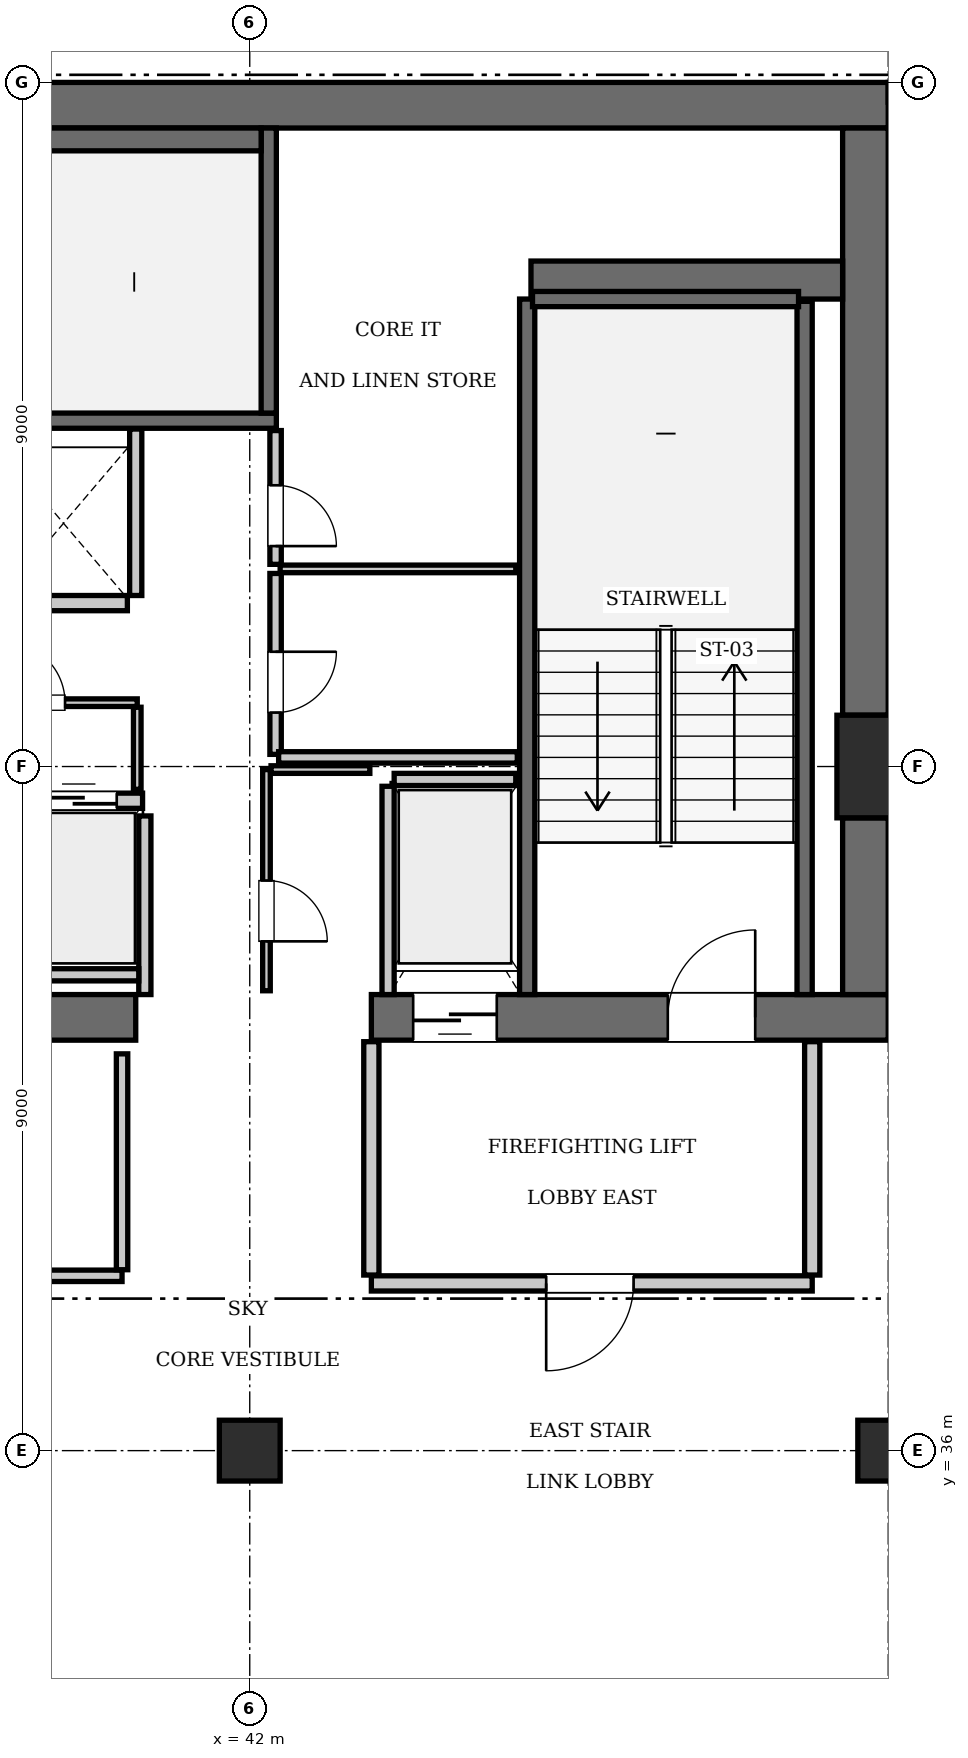
"""IFC4 building model, lengths in metres.
Left out: names, types, materials, properties, quantities, classifications, styles, units other than length and angle.
Written with IfcOpenShell. Run it as: python <this file> out.ifc"""

import sys

from ifc_helpers import new_model, si_unit, direction, frame, frame_2d, origin, origin_2d, place, context, subcontext, project, spatial, rectangle, extrude, element, fill, save


model = new_model("IFC4")
c1 = context("Model", 3, precision=1e-05, world=origin(), true_north=direction((0.0, 1.0)))
c2 = subcontext(c1, "Body", "Model", "MODEL_VIEW")
j1 = project(units=[si_unit("LENGTHUNIT", "METRE"), si_unit("PLANEANGLEUNIT", "RADIAN")], contexts=[c1])
p1 = place(None, origin())
s1 = spatial("IfcSite", under=j1, at=p1, CompositionType="ELEMENT")
p2 = place(p1, origin())
s2 = spatial("IfcBuilding", under=s1, at=p2, CompositionType="ELEMENT")
p3 = place(p2, frame((0.0, 0.0, 325.85)))
s3 = spatial("IfcBuildingStorey", under=s2, at=p3, CompositionType="ELEMENT", Elevation=325.85)
p4 = place(p3, frame((50.4, 45.0, 0.0), z_axis=(0.0, 0.0, 1.0), x_axis=(1.0, 0.0, 0.0)))
e1 = element("IfcColumn", 1, at=p4, inside=s3, PredefinedType="COLUMN", context=c2, shape_type="SweptSolid", body=[
    extrude(rectangle(XDim=1.35, YDim=1.35, at=origin_2d()), origin(), (0.0, 0.0, 1.0), 3.85),
])
p5 = place(p3, frame((25.2, 53.7, 0.0), z_axis=(0.0, 0.0, 1.0), x_axis=(1.0, 0.0, 0.0)))
e2 = element("IfcWall", 2, at=p5, inside=s3, PredefinedType="SHEAR", context=c2, shape_type="SweptSolid", body=[
    extrude(rectangle(XDim=25.2, YDim=0.6, at=frame_2d((12.6, 0.0))), origin(), (0.0, 0.0, 1.0), 3.85),
])
p6 = place(p3, frame((35.1, 41.7, 0.0), z_axis=(0.0, 0.0, 1.0), x_axis=(1.0, 0.0, 0.0)))
e3 = element("IfcWall", 3, at=p6, inside=s3, PredefinedType="SHEAR", context=c2, shape_type="SweptSolid", body=[
    extrude(rectangle(XDim=5.4, YDim=0.6, at=frame_2d((2.7, 0.0))), origin(), (0.0, 0.0, 1.0), 3.85),
])
p7 = place(p3, frame((43.6, 41.7, 0.0), z_axis=(0.0, 0.0, 1.0), x_axis=(1.0, 0.0, 0.0)))
e4 = element("IfcWall", 4, at=p7, inside=s3, PredefinedType="SHEAR", context=c2, shape_type="SweptSolid", body=[
    extrude(rectangle(XDim=6.8, YDim=0.6, at=frame_2d((3.4, 0.0))), origin(), (0.0, 0.0, 1.0), 3.85),
])
p8 = place(p7, frame((3.9, 0.0, 0.0)))
e5 = element("IfcOpeningElement", 5, at=p8, cuts=e4, PredefinedType="OPENING", context=c2, shape_type="SweptSolid", body=[
    extrude(rectangle(XDim=1.15, YDim=2.15, at=frame_2d((0.575, 1.075))), frame((0.0, 0.31, 0.0), z_axis=(0.0, -1.0, 0.0), x_axis=(1.0, 0.0, 0.0)), (0.0, 0.0, 1.0), 0.62),
])
p9 = place(p7, frame((0.55, 0.0, 0.0)))
e6 = element("IfcOpeningElement", 6, at=p9, cuts=e4, PredefinedType="OPENING", context=c2, shape_type="SweptSolid", body=[
    extrude(rectangle(XDim=1.1, YDim=2.2, at=frame_2d((0.55, 1.1))), frame((0.0, 0.31, 0.0), z_axis=(0.0, -1.0, 0.0), x_axis=(1.0, 0.0, 0.0)), (0.0, 0.0, 1.0), 0.62),
])
p10 = place(p3, frame((50.1, 42.0, 0.0), z_axis=(0.0, 0.0, 1.0), x_axis=(0.0, 1.0, 0.0)))
e7 = element("IfcWall", 7, at=p10, inside=s3, PredefinedType="SHEAR", context=c2, shape_type="SweptSolid", body=[
    extrude(rectangle(XDim=2.325, YDim=0.6, at=frame_2d((1.163, 0.0))), origin(), (0.0, 0.0, 1.0), 3.85),
])
p11 = place(p3, frame((50.1, 45.675, 0.0), z_axis=(0.0, 0.0, 1.0), x_axis=(0.0, 1.0, 0.0)))
e8 = element("IfcWall", 8, at=p11, inside=s3, PredefinedType="SHEAR", context=c2, shape_type="SweptSolid", body=[
    extrude(rectangle(XDim=7.725, YDim=0.6, at=frame_2d((3.862, 0.0))), origin(), (0.0, 0.0, 1.0), 3.85),
])
p12 = place(p3, frame((45.7, 51.4, 0.0), z_axis=(0.0, 0.0, 1.0), x_axis=(1.0, 0.0, 0.0)))
e9 = element("IfcWall", 9, at=p12, inside=s3, PredefinedType="SHEAR", context=c2, shape_type="SweptSolid", body=[
    extrude(rectangle(XDim=4.1, YDim=0.5, at=frame_2d((2.05, 0.0))), origin(), (0.0, 0.0, 1.0), 3.85),
])
for number, where, z_axis, x_axis in (
    (10, (42.0, 36.0, 0.0), (0.0, 0.0, 1.0), (1.0, 0.0, 0.0)),
    (11, (50.4, 36.0, 0.0), (0.0, 0.0, 1.0), (1.0, 0.0, 0.0)),
):
    element("IfcColumn", number, at=place(p3, frame(where, z_axis=z_axis, x_axis=x_axis)), inside=s3, PredefinedType="COLUMN", context=c2, shape_type="SweptSolid", body=[
        extrude(rectangle(XDim=0.8, YDim=0.8, at=origin_2d()), origin(), (0.0, 0.0, 1.0), 3.85),
    ])
p13 = place(p3, frame((33.25, 49.55, 0.0), z_axis=(0.0, 0.0, 1.0), x_axis=(1.0, 0.0, 0.0)))
e12 = element("IfcWall", 12, at=p13, inside=s3, PredefinedType="SOLIDWALL", context=c2, shape_type="SweptSolid", body=[
    extrude(rectangle(XDim=9.1, YDim=0.2, at=frame_2d((4.55, 0.0))), origin(), (0.0, 0.0, 1.0), 3.61),
])
p14 = place(p3, frame((42.25, 49.65, 0.0), z_axis=(0.0, 0.0, 1.0), x_axis=(0.0, 1.0, 0.0)))
e13 = element("IfcWall", 13, at=p14, inside=s3, PredefinedType="SOLIDWALL", context=c2, shape_type="SweptSolid", body=[
    extrude(rectangle(XDim=3.75, YDim=0.2, at=frame_2d((1.875, 0.0))), origin(), (0.0, 0.0, 1.0), 3.61),
])
p15 = place(p3, frame((33.45, 53.25, 0.0), z_axis=(0.0, 0.0, 1.0), x_axis=(1.0, 0.0, 0.0)))
e14 = element("IfcWall", 14, at=p15, inside=s3, PredefinedType="SOLIDWALL", context=c2, shape_type="SweptSolid", body=[
    extrude(rectangle(XDim=8.7, YDim=0.3, at=frame_2d((4.35, 0.0))), origin(), (0.0, 0.0, 1.0), 3.61),
])
p16 = place(p3, frame((45.65, 42.0, 0.0), z_axis=(0.0, 0.0, 1.0), x_axis=(0.0, 1.0, 0.0)))
e15 = element("IfcWall", 15, at=p16, inside=s3, PredefinedType="SOLIDWALL", context=c2, shape_type="SweptSolid", body=[
    extrude(rectangle(XDim=9.15, YDim=0.2, at=frame_2d((4.575, 0.0))), origin(), (0.0, 0.0, 1.0), 3.61),
])
p17 = place(p3, frame((49.3, 42.0, 0.0), z_axis=(0.0, 0.0, 1.0), x_axis=(0.0, 1.0, 0.0)))
e16 = element("IfcWall", 16, at=p17, inside=s3, PredefinedType="SOLIDWALL", context=c2, shape_type="SweptSolid", body=[
    extrude(rectangle(XDim=9.12, YDim=0.2, at=frame_2d((4.56, 0.0))), origin(), (0.0, 0.0, 1.0), 3.61),
])
p18 = place(p3, frame((45.72, 51.15, 0.0), z_axis=(0.0, 0.0, 1.0), x_axis=(1.0, 0.0, 0.0)))
e17 = element("IfcWall", 17, at=p18, inside=s3, PredefinedType="SOLIDWALL", context=c2, shape_type="SweptSolid", body=[
    extrude(rectangle(XDim=3.5, YDim=0.2, at=frame_2d((1.75, 0.0))), origin(), (0.0, 0.0, 1.0), 3.61),
])
p19 = place(p3, frame((38.91, 44.55, 0.0), z_axis=(0.0, 0.0, 1.0), x_axis=(1.0, 0.0, 0.0)))
e18 = element("IfcWall", 18, at=p19, inside=s3, PredefinedType="SOLIDWALL", context=c2, shape_type="SweptSolid", body=[
    extrude(rectangle(XDim=1.68, YDim=0.2, at=frame_2d((0.84, 0.0))), origin(), (0.0, 0.0, 1.0), 3.61),
])
p20 = place(p19, frame((0.34, 0.0, 0.0)))
e19 = element("IfcOpeningElement", 19, at=p20, cuts=e18, PredefinedType="OPENING", context=c2, shape_type="SweptSolid", body=[
    extrude(rectangle(XDim=1.0, YDim=2.15, at=frame_2d((0.5, 1.075))), frame((0.0, 0.11, 0.0), z_axis=(0.0, -1.0, 0.0), x_axis=(1.0, 0.0, 0.0)), (0.0, 0.0, 1.0), 0.22),
])
p21 = place(p3, frame((38.71, 47.15, 0.0), z_axis=(0.0, 0.0, 1.0), x_axis=(1.0, 0.0, 0.0)))
e20 = element("IfcWall", 20, at=p21, inside=s3, PredefinedType="SOLIDWALL", context=c2, shape_type="SweptSolid", body=[
    extrude(rectangle(XDim=1.68, YDim=0.2, at=frame_2d((0.84, 0.0))), origin(), (0.0, 0.0, 1.0), 3.61),
])
p22 = place(p3, frame((43.9, 44.83, 0.0), z_axis=(0.0, 0.0, 1.0), x_axis=(1.0, 0.0, 0.0)))
e21 = element("IfcWall", 21, at=p22, inside=s3, PredefinedType="SOLIDWALL", context=c2, shape_type="SweptSolid", body=[
    extrude(rectangle(XDim=1.6, YDim=0.16, at=frame_2d((0.8, 0.0))), origin(), (0.0, 0.0, 1.0), 3.61),
])
p23 = place(p3, frame((43.82, 42.0, 0.0), z_axis=(0.0, 0.0, 1.0), x_axis=(0.0, 1.0, 0.0)))
e22 = element("IfcWall", 22, at=p23, inside=s3, PredefinedType="SOLIDWALL", context=c2, shape_type="SweptSolid", body=[
    extrude(rectangle(XDim=2.74, YDim=0.16, at=frame_2d((1.37, 0.0))), origin(), (0.0, 0.0, 1.0), 3.61),
])
p24 = place(p3, frame((40.62, 42.0, 0.0), z_axis=(0.0, 0.0, 1.0), x_axis=(0.0, 1.0, 0.0)))
e23 = element("IfcWall", 23, at=p24, inside=s3, PredefinedType="SOLIDWALL", context=c2, shape_type="SweptSolid", body=[
    extrude(rectangle(XDim=2.35, YDim=0.16, at=frame_2d((1.175, 0.0))), origin(), (0.0, 0.0, 1.0), 3.61),
])
p25 = place(p3, frame((35.52, 42.26, 0.0), z_axis=(0.0, 0.0, 1.0), x_axis=(1.0, 0.0, 0.0)))
e24 = element("IfcWall", 24, at=p25, inside=s3, PredefinedType="SOLIDWALL", context=c2, shape_type="SweptSolid", body=[
    extrude(rectangle(XDim=5.02, YDim=0.16, at=frame_2d((2.51, 0.0))), origin(), (0.0, 0.0, 1.0), 3.61),
])
p26 = place(p3, frame((40.5, 47.25, 0.0), z_axis=(0.0, 0.0, 1.0), x_axis=(0.0, 1.0, 0.0)))
e25 = element("IfcWall", 25, at=p26, inside=s3, PredefinedType="SOLIDWALL", context=c2, shape_type="SweptSolid", body=[
    extrude(rectangle(XDim=2.19, YDim=0.16, at=frame_2d((1.095, 0.0))), origin(), (0.0, 0.0, 1.0), 3.61),
])
p27 = place(p3, frame((43.6, 38.2, 0.0), z_axis=(0.0, 0.0, 1.0), x_axis=(1.0, 0.0, 0.0)))
e26 = element("IfcWall", 26, at=p27, inside=s3, PredefinedType="PARTITIONING", context=c2, shape_type="SweptSolid", body=[
    extrude(rectangle(XDim=5.8, YDim=0.2, at=frame_2d((2.9, 0.0))), origin(), (0.0, 0.0, 1.0), 3.61),
])
p28 = place(p27, frame((2.3, 0.0, 0.0)))
e27 = element("IfcOpeningElement", 27, at=p28, cuts=e26, PredefinedType="OPENING", context=c2, shape_type="SweptSolid", body=[
    extrude(rectangle(XDim=1.15, YDim=2.15, at=frame_2d((0.575, 1.075))), frame((0.0, 0.11, 0.0), z_axis=(0.0, -1.0, 0.0), x_axis=(1.0, 0.0, 0.0)), (0.0, 0.0, 1.0), 0.22),
])
for number, where, z_axis, x_axis in (
    (28, (43.6, 38.31, 0.0), (0.0, 0.0, 1.0), (0.0, 1.0, 0.0)),
    (29, (49.4, 38.31, 0.0), (0.0, 0.0, 1.0), (0.0, 1.0, 0.0)),
):
    element("IfcWall", number, at=place(p3, frame(where, z_axis=z_axis, x_axis=x_axis)), inside=s3, PredefinedType="PARTITIONING", context=c2, shape_type="SweptSolid", body=[
        extrude(rectangle(XDim=3.07, YDim=0.2, at=frame_2d((1.535, 0.0))), origin(), (0.0, 0.0, 1.0), 3.61),
    ])
p29 = place(p3, frame((38.02, 45.84, 0.0), z_axis=(0.0, 0.0, 1.0), x_axis=(1.0, 0.0, 0.0)))
e30 = element("IfcWall", 30, at=p29, inside=s3, PredefinedType="PARTITIONING", context=c2, shape_type="SweptSolid", body=[
    extrude(rectangle(XDim=2.5, YDim=0.1, at=frame_2d((1.25, 0.0))), origin(), (0.0, 0.0, 1.0), 3.61),
])
p30 = place(p29, frame((0.75, 0.0, 0.0)))
e31 = element("IfcOpeningElement", 31, at=p30, cuts=e30, PredefinedType="OPENING", context=c2, shape_type="SweptSolid", body=[
    extrude(rectangle(XDim=0.8, YDim=2.05, at=frame_2d((0.4, 1.025))), frame((0.0, 0.06, 0.0), z_axis=(0.0, -1.0, 0.0), x_axis=(1.0, 0.0, 0.0)), (0.0, 0.0, 1.0), 0.12),
])
p31 = place(p3, frame((40.52, 44.7, 0.0), z_axis=(0.0, 0.0, 1.0), x_axis=(0.0, 1.0, 0.0)))
e32 = element("IfcWall", 32, at=p31, inside=s3, PredefinedType="PARTITIONING", context=c2, shape_type="SweptSolid", body=[
    extrude(rectangle(XDim=1.08, YDim=0.1, at=frame_2d((0.54, 0.0))), origin(), (0.0, 0.0, 1.0), 3.61),
])
p32 = place(p3, frame((42.22, 42.05, 0.0), z_axis=(0.0, 0.0, 1.0), x_axis=(0.0, 1.0, 0.0)))
e33 = element("IfcWall", 33, at=p32, inside=s3, PredefinedType="PARTITIONING", context=c2, shape_type="SweptSolid", body=[
    extrude(rectangle(XDim=2.91, YDim=0.1, at=frame_2d((1.455, 0.0))), origin(), (0.0, 0.0, 1.0), 3.61),
])
p33 = place(p32, frame((0.65, 0.0, 0.0)))
e34 = element("IfcOpeningElement", 34, at=p33, cuts=e33, PredefinedType="OPENING", context=c2, shape_type="SweptSolid", body=[
    extrude(rectangle(XDim=0.8, YDim=2.05, at=frame_2d((0.4, 1.025))), frame((0.0, 0.06, 0.0), z_axis=(0.0, -1.0, 0.0), x_axis=(1.0, 0.0, 0.0)), (0.0, 0.0, 1.0), 0.12),
])
p34 = place(p3, frame((42.28, 44.96, 0.0), z_axis=(0.0, 0.0, 1.0), x_axis=(1.0, 0.0, 0.0)))
e35 = element("IfcWall", 35, at=p34, inside=s3, PredefinedType="PARTITIONING", context=c2, shape_type="SweptSolid", body=[
    extrude(rectangle(XDim=1.3, YDim=0.1, at=frame_2d((0.65, 0.0))), origin(), (0.0, 0.0, 1.0), 3.61),
])
p35 = place(p3, frame((42.34, 45.16, 0.0), z_axis=(0.0, 0.0, 1.0), x_axis=(0.0, 1.0, 0.0)))
e36 = element("IfcWall", 36, at=p35, inside=s3, PredefinedType="PARTITIONING", context=c2, shape_type="SweptSolid", body=[
    extrude(rectangle(XDim=2.38, YDim=0.15, at=frame_2d((1.19, 0.0))), origin(), (0.0, 0.0, 1.0), 3.61),
])
p36 = place(p35, frame((0.55, 0.0, 0.0)))
e37 = element("IfcOpeningElement", 37, at=p36, cuts=e36, PredefinedType="OPENING", context=c2, shape_type="SweptSolid", body=[
    extrude(rectangle(XDim=0.8, YDim=2.05, at=frame_2d((0.4, 1.025))), frame((0.0, 0.085, 0.0), z_axis=(0.0, -1.0, 0.0), x_axis=(1.0, 0.0, 0.0)), (0.0, 0.0, 1.0), 0.17),
])
p37 = place(p3, frame((42.34, 47.66, 0.0), z_axis=(0.0, 0.0, 1.0), x_axis=(0.0, 1.0, 0.0)))
e38 = element("IfcWall", 38, at=p37, inside=s3, PredefinedType="PARTITIONING", context=c2, shape_type="SweptSolid", body=[
    extrude(rectangle(XDim=1.76, YDim=0.15, at=frame_2d((0.88, 0.0))), origin(), (0.0, 0.0, 1.0), 3.61),
])
p38 = place(p37, frame((0.24, 0.0, 0.0)))
e39 = element("IfcOpeningElement", 39, at=p38, cuts=e38, PredefinedType="OPENING", context=c2, shape_type="SweptSolid", body=[
    extrude(rectangle(XDim=0.8, YDim=2.05, at=frame_2d((0.4, 1.025))), frame((0.0, 0.085, 0.0), z_axis=(0.0, -1.0, 0.0), x_axis=(1.0, 0.0, 0.0)), (0.0, 0.0, 1.0), 0.17),
])
p39 = place(p3, frame((42.4, 47.6, 0.0), z_axis=(0.0, 0.0, 1.0), x_axis=(1.0, 0.0, 0.0)))
e40 = element("IfcWall", 40, at=p39, inside=s3, PredefinedType="PARTITIONING", context=c2, shape_type="SweptSolid", body=[
    extrude(rectangle(XDim=3.1, YDim=0.1, at=frame_2d((1.55, 0.0))), origin(), (0.0, 0.0, 1.0), 3.61),
])
p40 = place(p3, frame((42.38, 45.12, 0.0), z_axis=(0.0, 0.0, 1.0), x_axis=(1.0, 0.0, 0.0)))
e41 = element("IfcWall", 41, at=p40, inside=s3, PredefinedType="PARTITIONING", context=c2, shape_type="SweptSolid", body=[
    extrude(rectangle(XDim=3.14, YDim=0.15, at=frame_2d((1.57, 0.0))), origin(), (0.0, 0.0, 1.0), 3.61),
])
p41 = place(p3, frame((37.38, 38.3, 0.0), z_axis=(0.0, 0.0, 1.0), x_axis=(1.0, 0.0, 0.0)))
e42 = element("IfcWall", 42, at=p41, inside=s3, PredefinedType="PARTITIONING", context=c2, shape_type="SweptSolid", body=[
    extrude(rectangle(XDim=2.94, YDim=0.15, at=frame_2d((1.47, 0.0))), origin(), (0.0, 0.0, 1.0), 3.61),
])
p42 = place(p41, frame((1.0, 0.0, 0.0)))
e43 = element("IfcOpeningElement", 43, at=p42, cuts=e42, PredefinedType="OPENING", context=c2, shape_type="SweptSolid", body=[
    extrude(rectangle(XDim=0.8, YDim=2.05, at=frame_2d((0.4, 1.025))), frame((0.0, 0.085, 0.0), z_axis=(0.0, -1.0, 0.0), x_axis=(1.0, 0.0, 0.0)), (0.0, 0.0, 1.0), 0.17),
])
p43 = place(p3, frame((40.32, 38.38, 0.0), z_axis=(0.0, 0.0, 1.0), x_axis=(0.0, 1.0, 0.0)))
e44 = element("IfcWall", 44, at=p43, inside=s3, PredefinedType="PARTITIONING", context=c2, shape_type="SweptSolid", body=[
    extrude(rectangle(XDim=2.84, YDim=0.15, at=frame_2d((1.42, 0.0))), origin(), (0.0, 0.0, 1.0), 3.61),
])
p44 = place(p8, origin())
e45 = element("IfcDoor", 45, at=p44, inside=s3, OperationType="SINGLE_SWING_RIGHT", PredefinedType="DOOR", context=c2, shape_type="SweptSolid", body=[
    extrude(rectangle(XDim=1.15, YDim=2.15, at=frame_2d((0.575, 1.075))), frame((0.0, 0.025, 0.0), z_axis=(0.0, -1.0, 0.0), x_axis=(1.0, 0.0, 0.0)), (0.0, 0.0, 1.0), 0.05),
])
fill(e5, e45)
p45 = place(p20, origin())
e46 = element("IfcDoor", 46, at=p45, inside=s3, OperationType="SLIDING_TO_LEFT", PredefinedType="DOOR", context=c2, shape_type="SweptSolid", body=[
    extrude(rectangle(XDim=1.0, YDim=2.15, at=frame_2d((0.5, 1.075))), frame((0.0, 0.025, 0.0), z_axis=(0.0, -1.0, 0.0), x_axis=(1.0, 0.0, 0.0)), (0.0, 0.0, 1.0), 0.05),
])
fill(e19, e46)
p46 = place(p9, frame((1.1, 0.0, 0.0), z_axis=(0.0, 0.0, 1.0), x_axis=(-1.0, 0.0, 0.0)))
e47 = element("IfcDoor", 47, at=p46, inside=s3, OperationType="SLIDING_TO_LEFT", PredefinedType="DOOR", context=c2, shape_type="SweptSolid", body=[
    extrude(rectangle(XDim=1.1, YDim=2.2, at=frame_2d((0.55, 1.1))), frame((0.0, 0.025, 0.0), z_axis=(0.0, -1.0, 0.0), x_axis=(1.0, 0.0, 0.0)), (0.0, 0.0, 1.0), 0.05),
])
fill(e6, e47)
p47 = place(p28, frame((1.15, 0.0, 0.0), z_axis=(0.0, 0.0, 1.0), x_axis=(-1.0, 0.0, 0.0)))
e48 = element("IfcDoor", 48, at=p47, inside=s3, OperationType="SINGLE_SWING_RIGHT", PredefinedType="DOOR", context=c2, shape_type="SweptSolid", body=[
    extrude(rectangle(XDim=1.15, YDim=2.15, at=frame_2d((0.575, 1.075))), frame((0.0, 0.025, 0.0), z_axis=(0.0, -1.0, 0.0), x_axis=(1.0, 0.0, 0.0)), (0.0, 0.0, 1.0), 0.05),
])
fill(e27, e48)
p48 = place(p30, origin())
e49 = element("IfcDoor", 49, at=p48, inside=s3, OperationType="SINGLE_SWING_LEFT", PredefinedType="DOOR", context=c2, shape_type="SweptSolid", body=[
    extrude(rectangle(XDim=0.8, YDim=2.05, at=frame_2d((0.4, 1.025))), frame((0.0, 0.025, 0.0), z_axis=(0.0, -1.0, 0.0), x_axis=(1.0, 0.0, 0.0)), (0.0, 0.0, 1.0), 0.05),
])
fill(e31, e49)
p49 = place(p33, frame((0.8, 0.0, 0.0), z_axis=(0.0, 0.0, 1.0), x_axis=(-1.0, 0.0, 0.0)))
e50 = element("IfcDoor", 50, at=p49, inside=s3, OperationType="SINGLE_SWING_RIGHT", PredefinedType="DOOR", context=c2, shape_type="SweptSolid", body=[
    extrude(rectangle(XDim=0.8, YDim=2.05, at=frame_2d((0.4, 1.025))), frame((0.0, 0.025, 0.0), z_axis=(0.0, -1.0, 0.0), x_axis=(1.0, 0.0, 0.0)), (0.0, 0.0, 1.0), 0.05),
])
fill(e34, e50)
p50 = place(p36, frame((0.8, 0.0, 0.0), z_axis=(0.0, 0.0, 1.0), x_axis=(-1.0, 0.0, 0.0)))
e51 = element("IfcDoor", 51, at=p50, inside=s3, OperationType="SINGLE_SWING_LEFT", PredefinedType="DOOR", context=c2, shape_type="SweptSolid", body=[
    extrude(rectangle(XDim=0.8, YDim=2.05, at=frame_2d((0.4, 1.025))), frame((0.0, 0.025, 0.0), z_axis=(0.0, -1.0, 0.0), x_axis=(1.0, 0.0, 0.0)), (0.0, 0.0, 1.0), 0.05),
])
fill(e37, e51)
p51 = place(p38, frame((0.8, 0.0, 0.0), z_axis=(0.0, 0.0, 1.0), x_axis=(-1.0, 0.0, 0.0)))
e52 = element("IfcDoor", 52, at=p51, inside=s3, OperationType="SINGLE_SWING_RIGHT", PredefinedType="DOOR", context=c2, shape_type="SweptSolid", body=[
    extrude(rectangle(XDim=0.8, YDim=2.05, at=frame_2d((0.4, 1.025))), frame((0.0, 0.025, 0.0), z_axis=(0.0, -1.0, 0.0), x_axis=(1.0, 0.0, 0.0)), (0.0, 0.0, 1.0), 0.05),
])
fill(e39, e52)
save(model, sys.argv[1])
